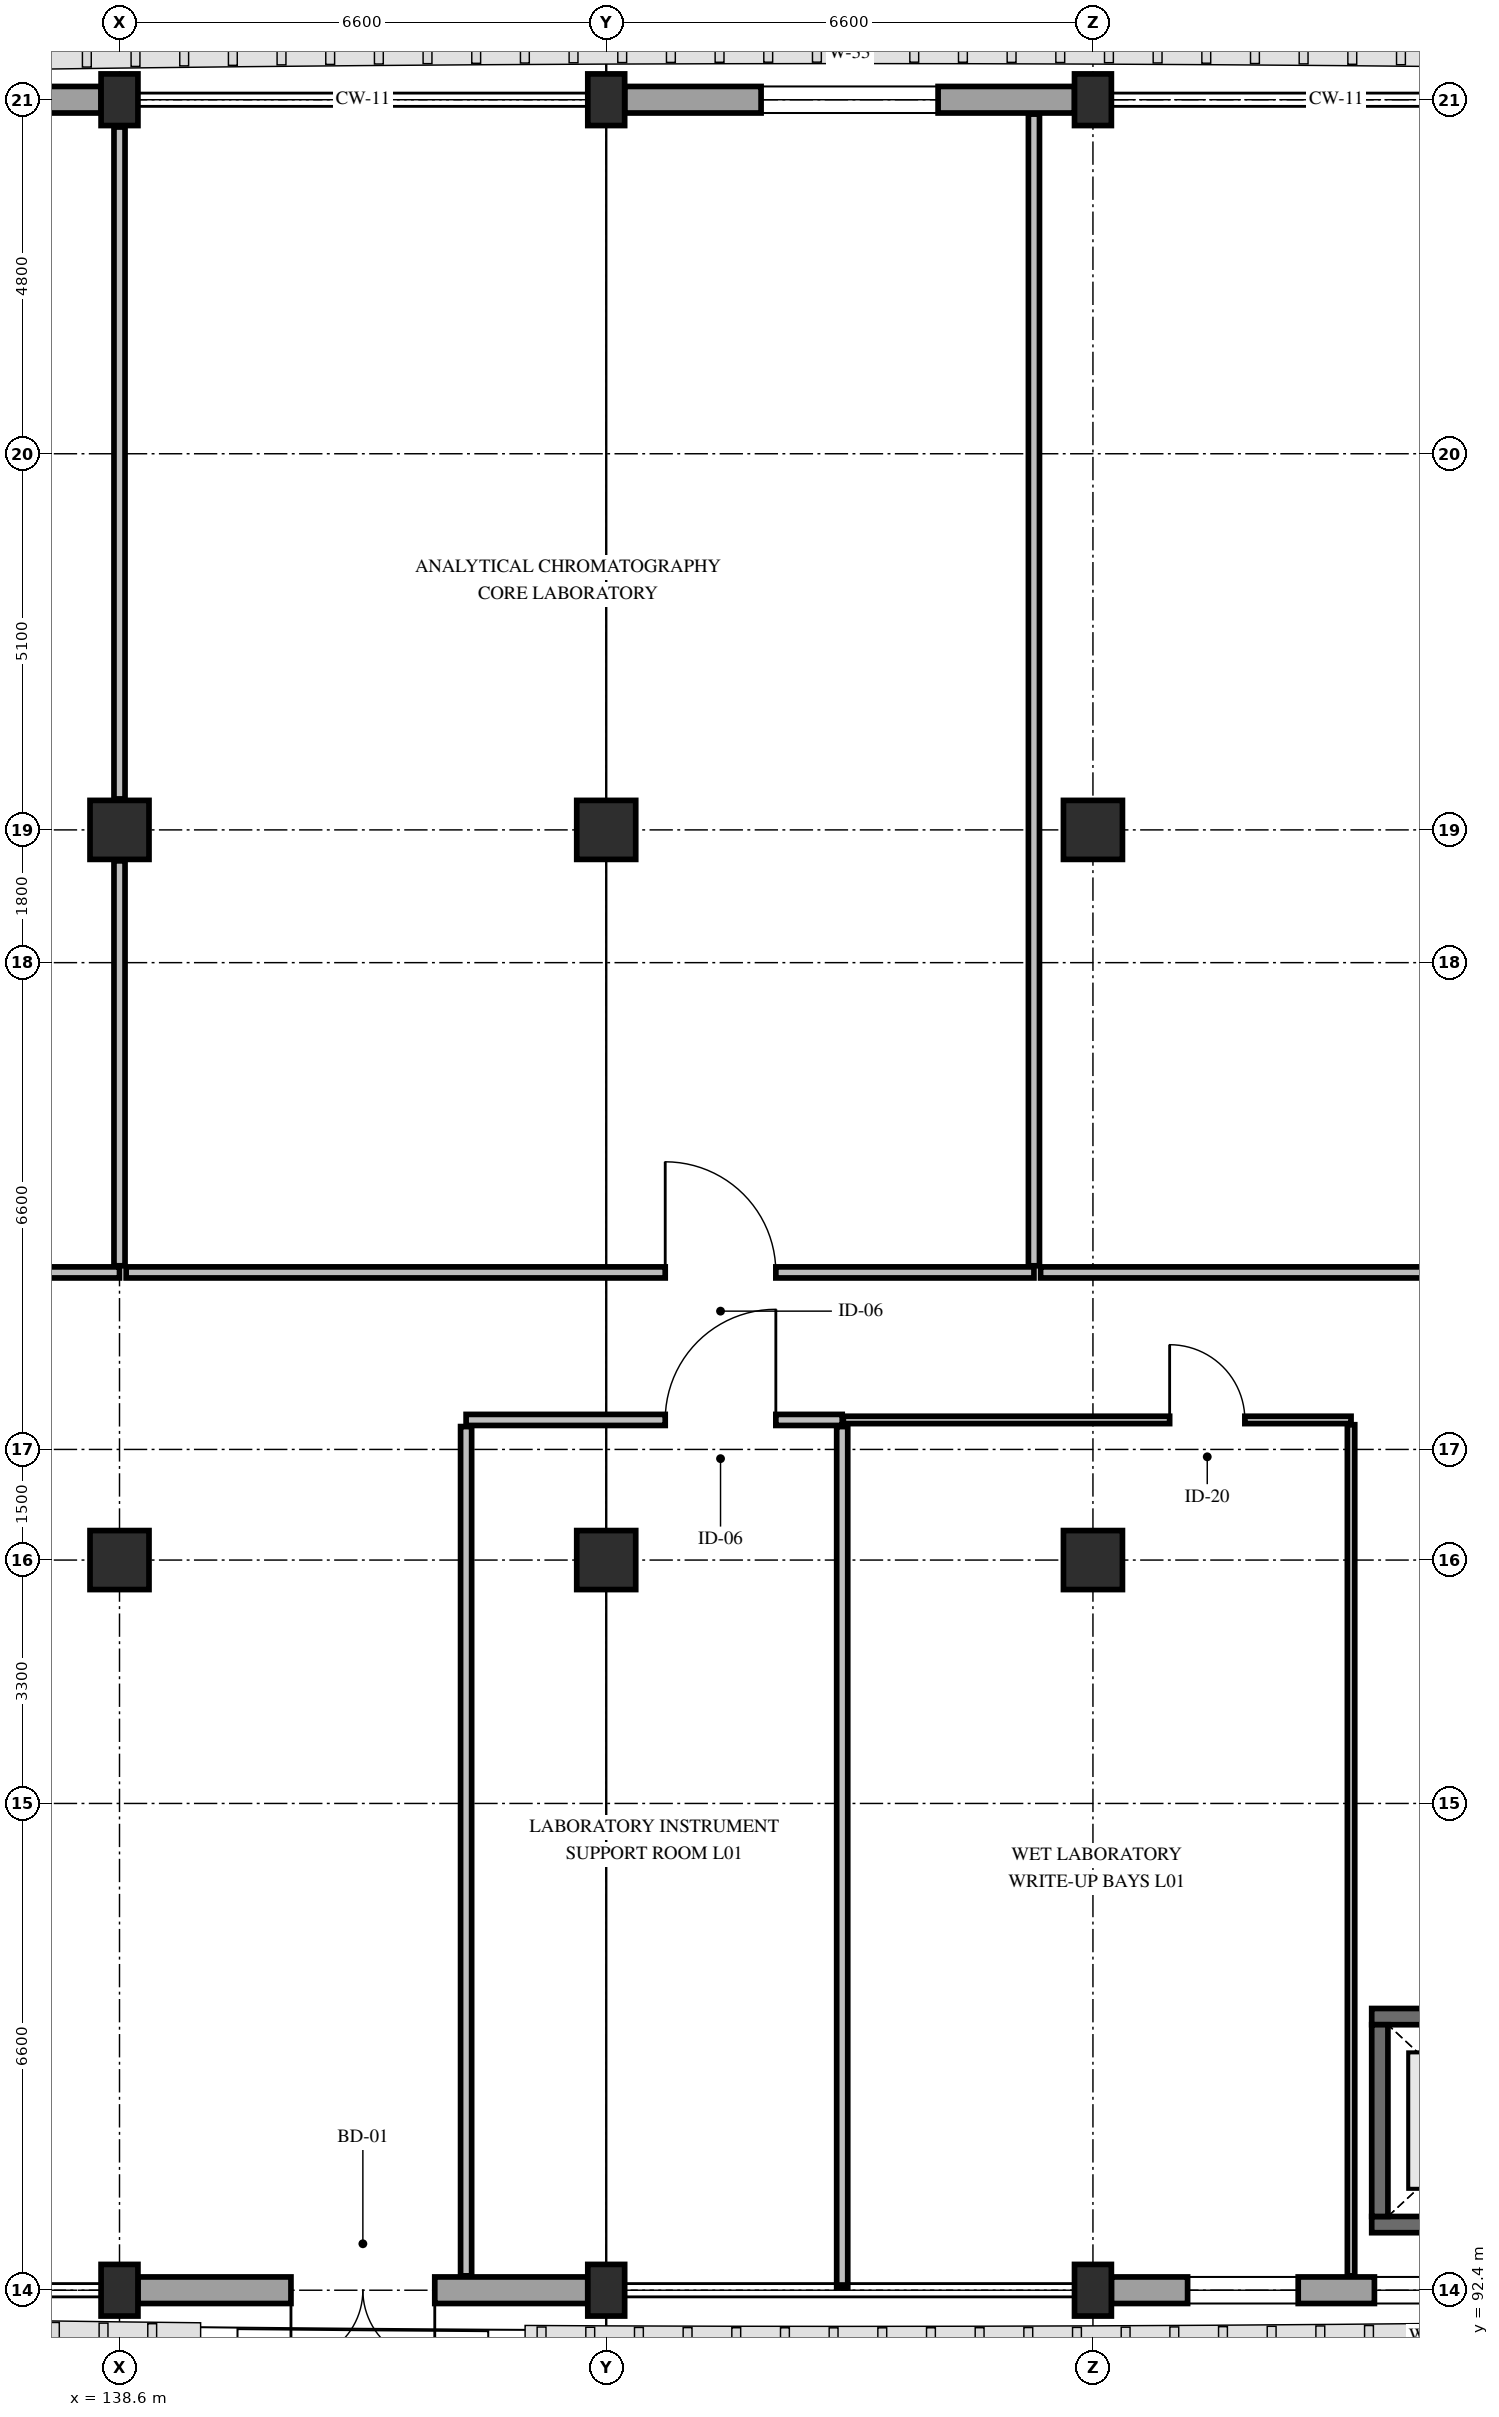
"""IFC4 building model, lengths in metres.
Left out: names, types, materials, properties, quantities, classifications, styles, units other than length and angle.
Written with IfcOpenShell. Run it as: python <this file> out.ifc"""

import sys

from ifc_helpers import new_model, si_unit, direction, frame, frame_2d, origin, origin_2d, place, context, subcontext, project, spatial, rectangle, extrude, element, fill, save


model = new_model("IFC4")
c1 = context("Model", 3, precision=1e-05, world=origin(), true_north=direction((0.0, 1.0)))
c2 = subcontext(c1, "Body", "Model", "MODEL_VIEW")
j1 = project(units=[si_unit("LENGTHUNIT", "METRE"), si_unit("PLANEANGLEUNIT", "RADIAN")], contexts=[c1])
p1 = place(None, origin())
s1 = spatial("IfcSite", under=j1, at=p1, CompositionType="ELEMENT")
p2 = place(p1, origin())
s2 = spatial("IfcBuilding", under=s1, at=p2, CompositionType="ELEMENT")
p3 = place(p2, frame((0.0, 0.0, 5.4)))
s3 = spatial("IfcBuildingStorey", under=s2, at=p3, CompositionType="ELEMENT", Elevation=5.4)
p4 = place(p3, frame((138.6, 92.4, 0.0), z_axis=(0.0, 0.0, 1.0), x_axis=(1.0, 0.0, 0.0)))
e1 = element("IfcColumn", 1, at=p4, inside=s3, PredefinedType="PILASTER", context=c2, shape_type="SweptSolid", body=[
    extrude(rectangle(XDim=0.5, YDim=0.7, at=origin_2d()), origin(), (0.0, 0.0, 1.0), 4.8),
])
for number, where, z_axis, x_axis in (
    (2, (138.6, 102.3, 0.0), (0.0, 0.0, 1.0), (1.0, 0.0, 0.0)),
    (3, (138.6, 112.2, 0.0), (0.0, 0.0, 1.0), (1.0, 0.0, 0.0)),
):
    element("IfcColumn", number, at=place(p3, frame(where, z_axis=z_axis, x_axis=x_axis)), inside=s3, PredefinedType="COLUMN", context=c2, shape_type="SweptSolid", body=[
        extrude(rectangle(XDim=0.8, YDim=0.8, at=origin_2d()), origin(), (0.0, 0.0, 1.0), 4.8),
    ])
for number, where, z_axis, x_axis in (
    (4, (138.6, 122.1, 0.0), (0.0, 0.0, 1.0), (1.0, 0.0, 0.0)),
    (5, (145.2, 92.4, 0.0), (0.0, 0.0, 1.0), (1.0, 0.0, 0.0)),
):
    element("IfcColumn", number, at=place(p3, frame(where, z_axis=z_axis, x_axis=x_axis)), inside=s3, PredefinedType="PILASTER", context=c2, shape_type="SweptSolid", body=[
        extrude(rectangle(XDim=0.5, YDim=0.7, at=origin_2d()), origin(), (0.0, 0.0, 1.0), 4.8),
    ])
for number, where, z_axis, x_axis in (
    (6, (145.2, 102.3, 0.0), (0.0, 0.0, 1.0), (1.0, 0.0, 0.0)),
    (7, (145.2, 112.2, 0.0), (0.0, 0.0, 1.0), (1.0, 0.0, 0.0)),
):
    element("IfcColumn", number, at=place(p3, frame(where, z_axis=z_axis, x_axis=x_axis)), inside=s3, PredefinedType="COLUMN", context=c2, shape_type="SweptSolid", body=[
        extrude(rectangle(XDim=0.8, YDim=0.8, at=origin_2d()), origin(), (0.0, 0.0, 1.0), 4.8),
    ])
for number, where, z_axis, x_axis in (
    (8, (145.2, 122.1, 0.0), (0.0, 0.0, 1.0), (1.0, 0.0, 0.0)),
    (9, (151.8, 92.4, 0.0), (0.0, 0.0, 1.0), (1.0, 0.0, 0.0)),
):
    element("IfcColumn", number, at=place(p3, frame(where, z_axis=z_axis, x_axis=x_axis)), inside=s3, PredefinedType="PILASTER", context=c2, shape_type="SweptSolid", body=[
        extrude(rectangle(XDim=0.5, YDim=0.7, at=origin_2d()), origin(), (0.0, 0.0, 1.0), 4.8),
    ])
for number, where, z_axis, x_axis in (
    (10, (151.8, 102.3, 0.0), (0.0, 0.0, 1.0), (1.0, 0.0, 0.0)),
    (11, (151.8, 112.2, 0.0), (0.0, 0.0, 1.0), (1.0, 0.0, 0.0)),
):
    element("IfcColumn", number, at=place(p3, frame(where, z_axis=z_axis, x_axis=x_axis)), inside=s3, PredefinedType="COLUMN", context=c2, shape_type="SweptSolid", body=[
        extrude(rectangle(XDim=0.8, YDim=0.8, at=origin_2d()), origin(), (0.0, 0.0, 1.0), 4.8),
    ])
p5 = place(p3, frame((151.8, 122.1, 0.0), z_axis=(0.0, 0.0, 1.0), x_axis=(1.0, 0.0, 0.0)))
e12 = element("IfcColumn", 12, at=p5, inside=s3, PredefinedType="PILASTER", context=c2, shape_type="SweptSolid", body=[
    extrude(rectangle(XDim=0.5, YDim=0.7, at=origin_2d()), origin(), (0.0, 0.0, 1.0), 4.8),
])
p6 = place(p3, frame((132.25, 122.1, 0.0), z_axis=(0.0, 0.0, 1.0), x_axis=(1.0, 0.0, 0.0)))
e13 = element("IfcWall", 13, at=p6, inside=s3, PredefinedType="STANDARD", context=c2, shape_type="SweptSolid", body=[
    extrude(rectangle(XDim=6.1, YDim=0.36, at=frame_2d((3.05, 0.0))), origin(), (0.0, 0.0, 1.0), 3.78),
])
p7 = place(p6, frame((1.85, 0.0, 0.85)))
e14 = element("IfcOpeningElement", 14, at=p7, cuts=e13, PredefinedType="OPENING", context=c2, shape_type="SweptSolid", body=[
    extrude(rectangle(XDim=2.4, YDim=1.88, at=frame_2d((1.2, 0.94))), frame((0.0, 0.195, 0.0), z_axis=(0.0, -1.0, 0.0), x_axis=(1.0, 0.0, 0.0)), (0.0, 0.0, 1.0), 0.39),
])
p8 = place(p3, frame((145.45, 122.1, 0.0), z_axis=(0.0, 0.0, 1.0), x_axis=(1.0, 0.0, 0.0)))
e15 = element("IfcWall", 15, at=p8, inside=s3, PredefinedType="STANDARD", context=c2, shape_type="SweptSolid", body=[
    extrude(rectangle(XDim=6.1, YDim=0.36, at=frame_2d((3.05, 0.0))), origin(), (0.0, 0.0, 1.0), 3.78),
])
p9 = place(p8, frame((1.85, 0.0, 0.85)))
e16 = element("IfcOpeningElement", 16, at=p9, cuts=e15, PredefinedType="OPENING", context=c2, shape_type="SweptSolid", body=[
    extrude(rectangle(XDim=2.4, YDim=1.88, at=frame_2d((1.2, 0.94))), frame((0.0, 0.195, 0.0), z_axis=(0.0, -1.0, 0.0), x_axis=(1.0, 0.0, 0.0)), (0.0, 0.0, 1.0), 0.39),
])
p10 = place(p3, frame((158.15, 92.4, 0.0), z_axis=(0.0, 0.0, 1.0), x_axis=(-1.0, 0.0, 0.0)))
e17 = element("IfcWall", 17, at=p10, inside=s3, PredefinedType="STANDARD", context=c2, shape_type="SweptSolid", body=[
    extrude(rectangle(XDim=6.1, YDim=0.36, at=frame_2d((3.05, 0.0))), origin(), (0.0, 0.0, 1.0), 3.78),
])
p11 = place(p10, frame((1.033, 0.0, 0.85)))
e18 = element("IfcOpeningElement", 18, at=p11, cuts=e17, PredefinedType="OPENING", context=c2, shape_type="SweptSolid", body=[
    extrude(rectangle(XDim=1.5, YDim=2.08, at=frame_2d((0.75, 1.04))), frame((0.0, 0.195, 0.0), z_axis=(0.0, -1.0, 0.0), x_axis=(1.0, 0.0, 0.0)), (0.0, 0.0, 1.0), 0.39),
])
p12 = place(p10, frame((3.567, 0.0, 0.85)))
e19 = element("IfcOpeningElement", 19, at=p12, cuts=e17, PredefinedType="OPENING", context=c2, shape_type="SweptSolid", body=[
    extrude(rectangle(XDim=1.5, YDim=2.08, at=frame_2d((0.75, 1.04))), frame((0.0, 0.195, 0.0), z_axis=(0.0, -1.0, 0.0), x_axis=(1.0, 0.0, 0.0)), (0.0, 0.0, 1.0), 0.39),
])
p13 = place(p3, frame((144.95, 92.4, 0.0), z_axis=(0.0, 0.0, 1.0), x_axis=(-1.0, 0.0, 0.0)))
e20 = element("IfcWall", 20, at=p13, inside=s3, PredefinedType="STANDARD", context=c2, shape_type="SweptSolid", body=[
    extrude(rectangle(XDim=6.1, YDim=0.36, at=frame_2d((3.05, 0.0))), origin(), (0.0, 0.0, 1.0), 3.78),
])
p14 = place(p13, frame((2.075, 0.0, 0.0)))
e21 = element("IfcOpeningElement", 21, at=p14, cuts=e20, PredefinedType="OPENING", context=c2, shape_type="SweptSolid", body=[
    extrude(rectangle(XDim=1.95, YDim=2.35, at=frame_2d((0.975, 1.175))), frame((0.0, 0.195, 0.0), z_axis=(0.0, -1.0, 0.0), x_axis=(1.0, 0.0, 0.0)), (0.0, 0.0, 1.0), 0.39),
])
p15 = place(p3, frame((155.58, 93.29, 0.0), z_axis=(0.0, 0.0, 1.0), x_axis=(1.0, 0.0, 0.0)))
e22 = element("IfcWall", 22, at=p15, inside=s3, PredefinedType="SHEAR", context=c2, shape_type="SweptSolid", body=[
    extrude(rectangle(XDim=3.24, YDim=0.22, at=frame_2d((1.62, 0.0))), origin(), (0.0, 0.0, 1.0), 4.46),
])
p16 = place(p3, frame((155.58, 96.11, 0.0), z_axis=(0.0, 0.0, 1.0), x_axis=(1.0, 0.0, 0.0)))
e23 = element("IfcWall", 23, at=p16, inside=s3, PredefinedType="SHEAR", context=c2, shape_type="SweptSolid", body=[
    extrude(rectangle(XDim=3.24, YDim=0.22, at=frame_2d((1.62, 0.0))), origin(), (0.0, 0.0, 1.0), 4.46),
])
p17 = place(p16, frame((0.92, 0.0, 0.0)))
e24 = element("IfcOpeningElement", 24, at=p17, cuts=e23, PredefinedType="OPENING", context=c2, shape_type="SweptSolid", body=[
    extrude(rectangle(XDim=1.4, YDim=2.3, at=frame_2d((0.7, 1.15))), frame((0.0, 0.125, 0.0), z_axis=(0.0, -1.0, 0.0), x_axis=(1.0, 0.0, 0.0)), (0.0, 0.0, 1.0), 0.25),
])
p18 = place(p3, frame((155.69, 93.4, 0.0), z_axis=(0.0, 0.0, 1.0), x_axis=(0.0, 1.0, 0.0)))
e25 = element("IfcWall", 25, at=p18, inside=s3, PredefinedType="SHEAR", context=c2, shape_type="SweptSolid", body=[
    extrude(rectangle(XDim=2.6, YDim=0.22, at=frame_2d((1.3, 0.0))), origin(), (0.0, 0.0, 1.0), 4.46),
])
p19 = place(p3, frame((125.4, 106.2, 0.0), z_axis=(0.0, 0.0, 1.0), x_axis=(1.0, 0.0, 0.0)))
e26 = element("IfcWall", 26, at=p19, inside=s3, PredefinedType="PARTITIONING", context=c2, shape_type="SweptSolid", body=[
    extrude(rectangle(XDim=13.2, YDim=0.15, at=frame_2d((6.6, 0.0))), origin(), (0.0, 0.0, 1.0), 3.78),
])
p20 = place(p19, frame((7.37, 0.0, 0.0)))
e27 = element("IfcOpeningElement", 27, at=p20, cuts=e26, PredefinedType="OPENING", context=c2, shape_type="SweptSolid", body=[
    extrude(rectangle(XDim=1.56, YDim=2.3, at=frame_2d((0.78, 1.15))), frame((0.0, 0.09, 0.0), z_axis=(0.0, -1.0, 0.0), x_axis=(1.0, 0.0, 0.0)), (0.0, 0.0, 1.0), 0.18),
])
p21 = place(p3, frame((138.6, 106.29, 0.0), z_axis=(0.0, 0.0, 1.0), x_axis=(0.0, 1.0, 0.0)))
e28 = element("IfcWall", 28, at=p21, inside=s3, PredefinedType="PARTITIONING", context=c2, shape_type="SweptSolid", body=[
    extrude(rectangle(XDim=5.49, YDim=0.15, at=frame_2d((2.745, 0.0))), origin(), (0.0, 0.0, 1.0), 3.78),
])
p22 = place(p3, frame((138.6, 112.62, 0.0), z_axis=(0.0, 0.0, 1.0), x_axis=(0.0, 1.0, 0.0)))
e29 = element("IfcWall", 29, at=p22, inside=s3, PredefinedType="PARTITIONING", context=c2, shape_type="SweptSolid", body=[
    extrude(rectangle(XDim=9.11, YDim=0.15, at=frame_2d((4.555, 0.0))), origin(), (0.0, 0.0, 1.0), 3.78),
])
p23 = place(p3, frame((138.69, 106.2, 0.0), z_axis=(0.0, 0.0, 1.0), x_axis=(1.0, 0.0, 0.0)))
e30 = element("IfcWall", 30, at=p23, inside=s3, PredefinedType="PARTITIONING", context=c2, shape_type="SweptSolid", body=[
    extrude(rectangle(XDim=12.31, YDim=0.15, at=frame_2d((6.155, 0.0))), origin(), (0.0, 0.0, 1.0), 3.78),
])
p24 = place(p23, frame((7.31, 0.0, 0.0)))
e31 = element("IfcOpeningElement", 31, at=p24, cuts=e30, PredefinedType="OPENING", context=c2, shape_type="SweptSolid", body=[
    extrude(rectangle(XDim=1.5, YDim=2.25, at=frame_2d((0.75, 1.125))), frame((0.0, 0.09, 0.0), z_axis=(0.0, -1.0, 0.0), x_axis=(1.0, 0.0, 0.0)), (0.0, 0.0, 1.0), 0.18),
])
p25 = place(p3, frame((151.0, 106.29, 0.0), z_axis=(0.0, 0.0, 1.0), x_axis=(0.0, 1.0, 0.0)))
e32 = element("IfcWall", 32, at=p25, inside=s3, PredefinedType="PARTITIONING", context=c2, shape_type="SweptSolid", body=[
    extrude(rectangle(XDim=15.615, YDim=0.15, at=frame_2d((7.808, 0.0))), origin(), (0.0, 0.0, 1.0), 3.93),
])
p26 = place(p3, frame((151.09, 106.2, 0.0), z_axis=(0.0, 0.0, 1.0), x_axis=(1.0, 0.0, 0.0)))
e33 = element("IfcWall", 33, at=p26, inside=s3, PredefinedType="PARTITIONING", context=c2, shape_type="SweptSolid", body=[
    extrude(rectangle(XDim=12.51, YDim=0.15, at=frame_2d((6.255, 0.0))), origin(), (0.0, 0.0, 1.0), 3.78),
])
p27 = place(p26, frame((8.05, 0.0, 0.0)))
e34 = element("IfcOpeningElement", 34, at=p27, cuts=e33, PredefinedType="OPENING", context=c2, shape_type="SweptSolid", body=[
    extrude(rectangle(XDim=1.62, YDim=2.3, at=frame_2d((0.81, 1.15))), frame((0.0, 0.09, 0.0), z_axis=(0.0, -1.0, 0.0), x_axis=(1.0, 0.0, 0.0)), (0.0, 0.0, 1.0), 0.18),
])
p28 = place(p3, frame((143.3, 104.2, 0.0), z_axis=(0.0, 0.0, 1.0), x_axis=(1.0, 0.0, 0.0)))
e35 = element("IfcWall", 35, at=p28, inside=s3, PredefinedType="PARTITIONING", context=c2, shape_type="SweptSolid", body=[
    extrude(rectangle(XDim=5.1, YDim=0.15, at=frame_2d((2.55, 0.0))), origin(), (0.0, 0.0, 1.0), 3.78),
])
p29 = place(p28, frame((2.7, 0.0, 0.0)))
e36 = element("IfcOpeningElement", 36, at=p29, cuts=e35, PredefinedType="OPENING", context=c2, shape_type="SweptSolid", body=[
    extrude(rectangle(XDim=1.5, YDim=2.25, at=frame_2d((0.75, 1.125))), frame((0.0, 0.09, 0.0), z_axis=(0.0, -1.0, 0.0), x_axis=(1.0, 0.0, 0.0)), (0.0, 0.0, 1.0), 0.18),
])
p30 = place(p3, frame((143.3, 92.595, 0.0), z_axis=(0.0, 0.0, 1.0), x_axis=(0.0, 1.0, 0.0)))
e37 = element("IfcWall", 37, at=p30, inside=s3, PredefinedType="PARTITIONING", context=c2, shape_type="SweptSolid", body=[
    extrude(rectangle(XDim=11.515, YDim=0.15, at=frame_2d((5.758, 0.0))), origin(), (0.0, 0.0, 1.0), 3.93),
])
p31 = place(p3, frame((148.4, 92.44, 0.0), z_axis=(0.0, 0.0, 1.0), x_axis=(0.0, 1.0, 0.0)))
e38 = element("IfcWall", 38, at=p31, inside=s3, PredefinedType="PARTITIONING", context=c2, shape_type="SweptSolid", body=[
    extrude(rectangle(XDim=11.67, YDim=0.15, at=frame_2d((5.835, 0.0))), origin(), (0.0, 0.0, 1.0), 3.93),
])
p32 = place(p3, frame((148.415, 104.2, 0.0), z_axis=(0.0, 0.0, 1.0), x_axis=(1.0, 0.0, 0.0)))
e39 = element("IfcWall", 39, at=p32, inside=s3, PredefinedType="PARTITIONING", context=c2, shape_type="SweptSolid", body=[
    extrude(rectangle(XDim=6.885, YDim=0.1, at=frame_2d((3.442, 0.0))), origin(), (0.0, 0.0, 1.0), 3.78),
])
p33 = place(p32, frame((4.425, 0.0, 0.0)))
e40 = element("IfcOpeningElement", 40, at=p33, cuts=e39, PredefinedType="OPENING", context=c2, shape_type="SweptSolid", body=[
    extrude(rectangle(XDim=1.02, YDim=2.2, at=frame_2d((0.51, 1.1))), frame((0.0, 0.065, 0.0), z_axis=(0.0, -1.0, 0.0), x_axis=(1.0, 0.0, 0.0)), (0.0, 0.0, 1.0), 0.13),
])
p34 = place(p3, frame((155.3, 92.595, 0.0), z_axis=(0.0, 0.0, 1.0), x_axis=(0.0, 1.0, 0.0)))
e41 = element("IfcWall", 41, at=p34, inside=s3, PredefinedType="PARTITIONING", context=c2, shape_type="SweptSolid", body=[
    extrude(rectangle(XDim=11.54, YDim=0.1, at=frame_2d((5.77, 0.0))), origin(), (0.0, 0.0, 1.0), 3.93),
])
p35 = place(p9, origin())
e42 = element("IfcWindow", 42, at=p35, inside=s3, PartitioningType="DOUBLE_PANEL_VERTICAL", PredefinedType="WINDOW", context=c2, shape_type="SweptSolid", body=[
    extrude(rectangle(XDim=2.4, YDim=1.88, at=frame_2d((1.2, 0.94))), frame((0.0, 0.03, 0.0), z_axis=(0.0, -1.0, 0.0), x_axis=(1.0, 0.0, 0.0)), (0.0, 0.0, 1.0), 0.06),
])
fill(e16, e42)
p36 = place(p11, origin())
e43 = element("IfcWindow", 43, at=p36, inside=s3, PartitioningType="SINGLE_PANEL", PredefinedType="WINDOW", context=c2, shape_type="SweptSolid", body=[
    extrude(rectangle(XDim=1.5, YDim=2.08, at=frame_2d((0.75, 1.04))), frame((0.0, 0.03, 0.0), z_axis=(0.0, -1.0, 0.0), x_axis=(1.0, 0.0, 0.0)), (0.0, 0.0, 1.0), 0.06),
])
fill(e18, e43)
p37 = place(p12, origin())
e44 = element("IfcWindow", 44, at=p37, inside=s3, PartitioningType="SINGLE_PANEL", PredefinedType="WINDOW", context=c2, shape_type="SweptSolid", body=[
    extrude(rectangle(XDim=1.5, YDim=2.08, at=frame_2d((0.75, 1.04))), frame((0.0, 0.03, 0.0), z_axis=(0.0, -1.0, 0.0), x_axis=(1.0, 0.0, 0.0)), (0.0, 0.0, 1.0), 0.06),
])
fill(e19, e44)
p38 = place(p14, origin())
e45 = element("IfcDoor", 45, at=p38, inside=s3, OperationType="DOUBLE_DOOR_SINGLE_SWING", PredefinedType="DOOR", context=c2, shape_type="SweptSolid", body=[
    extrude(rectangle(XDim=1.95, YDim=2.35, at=frame_2d((0.975, 1.175))), frame((0.0, 0.025, 0.0), z_axis=(0.0, -1.0, 0.0), x_axis=(1.0, 0.0, 0.0)), (0.0, 0.0, 1.0), 0.05),
])
fill(e21, e45)
p39 = place(p24, origin())
e46 = element("IfcDoor", 46, at=p39, inside=s3, OperationType="SINGLE_SWING_LEFT", PredefinedType="DOOR", context=c2, shape_type="SweptSolid", body=[
    extrude(rectangle(XDim=1.5, YDim=2.25, at=frame_2d((0.75, 1.125))), frame((0.0, 0.025, 0.0), z_axis=(0.0, -1.0, 0.0), x_axis=(1.0, 0.0, 0.0)), (0.0, 0.0, 1.0), 0.05),
])
fill(e31, e46)
p40 = place(p29, origin())
e47 = element("IfcDoor", 47, at=p40, inside=s3, OperationType="SINGLE_SWING_RIGHT", PredefinedType="DOOR", context=c2, shape_type="SweptSolid", body=[
    extrude(rectangle(XDim=1.5, YDim=2.25, at=frame_2d((0.75, 1.125))), frame((0.0, 0.025, 0.0), z_axis=(0.0, -1.0, 0.0), x_axis=(1.0, 0.0, 0.0)), (0.0, 0.0, 1.0), 0.05),
])
fill(e36, e47)
p41 = place(p33, origin())
e48 = element("IfcDoor", 48, at=p41, inside=s3, OperationType="SINGLE_SWING_LEFT", PredefinedType="DOOR", context=c2, shape_type="SweptSolid", body=[
    extrude(rectangle(XDim=1.02, YDim=2.2, at=frame_2d((0.51, 1.1))), frame((0.0, 0.025, 0.0), z_axis=(0.0, -1.0, 0.0), x_axis=(1.0, 0.0, 0.0)), (0.0, 0.0, 1.0), 0.05),
])
fill(e40, e48)
save(model, sys.argv[1])
